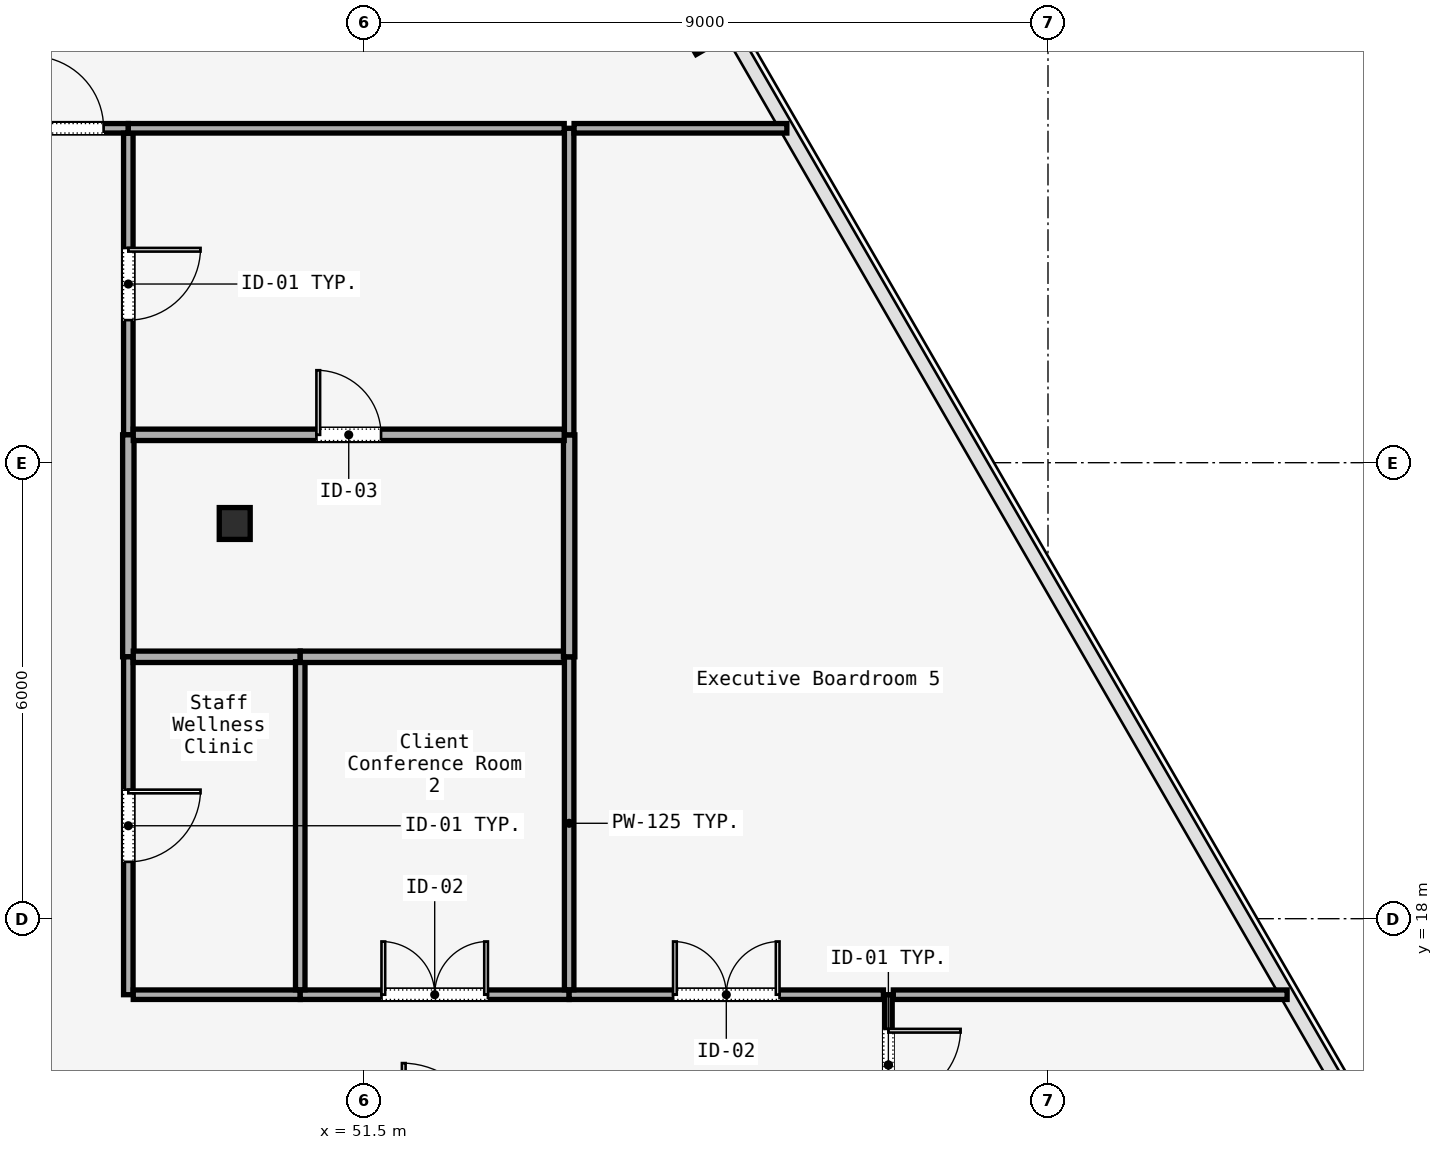
"""IFC4 building model, lengths in metres.
Left out: names, types, materials, properties, quantities, classifications, styles, units other than length and angle.
Written with IfcOpenShell. Run it as: python <this file> out.ifc"""

import sys

from ifc_helpers import new_model, si_unit, direction, frame, frame_2d, origin, origin_2d, place, context, subcontext, project, spatial, rectangle, i_section, extrude, element, fill, save


model = new_model("IFC4")
c1 = context("Model", 3, precision=1e-05, world=origin(), true_north=direction((0.0, 1.0)))
c2 = subcontext(c1, "Body", "Model", "MODEL_VIEW")
j1 = project(units=[si_unit("LENGTHUNIT", "METRE"), si_unit("PLANEANGLEUNIT", "RADIAN")], contexts=[c1])
p1 = place(None, origin())
s1 = spatial("IfcSite", under=j1, at=p1, CompositionType="ELEMENT")
p2 = place(p1, origin())
s2 = spatial("IfcBuilding", under=s1, at=p2, CompositionType="ELEMENT")
p3 = place(p2, frame((0.0, 0.0, 187.8)))
s3 = spatial("IfcBuildingStorey", under=s2, at=p3, CompositionType="ELEMENT", Elevation=187.8)
p4 = place(p3, frame((49.8, 23.2, 0.0), z_axis=(0.0, 0.0, 1.0), x_axis=(1.0, 0.0, 0.0)))
e1 = element("IfcColumn", 1, at=p4, inside=s3, PredefinedType="COLUMN", context=c2, shape_type="SweptSolid", body=[
    extrude(i_section(OverallWidth=0.407, OverallDepth=0.419, WebThickness=0.031, FlangeThickness=0.049, FilletRadius=0.015, at=origin_2d()), origin(), (0.0, 0.0, 1.0), 3.58),
])
p5 = place(p3, frame((55.964, 29.666, 0.0), z_axis=(-0.042672137749, -0.074064697685, 0.996340057017), x_axis=(-0.002485402633, 0.997253204902, 0.074026131112)))
e2 = element("IfcColumn", 2, at=p5, inside=s3, PredefinedType="COLUMN", context=c2, shape_type="SweptSolid", body=[
    extrude(i_section(OverallWidth=0.418, OverallDepth=0.455, WebThickness=0.042, FlangeThickness=0.052, FilletRadius=0.015, at=origin_2d()), origin(), (0.0, 0.0, 1.0), 3.593),
])
p6 = place(p3, frame((58.4, 17.0, 0.0), z_axis=(0.0, 0.0, 1.0), x_axis=(0.0, -1.0, 0.0)))
e3 = element("IfcWall", 3, at=p6, inside=s3, PredefinedType="MOVABLE", context=c2, shape_type="SweptSolid", body=[
    extrude(rectangle(XDim=1.85, YDim=0.1, at=frame_2d((0.925, 0.0))), origin(), (0.0, 0.0, 1.0), 3.01),
])
p7 = place(p6, frame((0.45, 0.0, 0.0)))
e4 = element("IfcOpeningElement", 4, at=p7, cuts=e3, PredefinedType="OPENING", context=c2, shape_type="SweptSolid", body=[
    extrude(rectangle(XDim=0.95, YDim=2.2, at=frame_2d((0.475, 1.1))), frame((0.0, 0.05, 0.0), z_axis=(0.0, -1.0, 0.0), x_axis=(1.0, 0.0, 0.0)), (0.0, 0.0, 1.0), 0.1),
])
p8 = place(p3, frame((46.8, 28.4, 0.0), z_axis=(0.0, 0.0, 1.0), x_axis=(1.0, 0.0, 0.0)))
e5 = element("IfcWall", 5, at=p8, inside=s3, PredefinedType="PARTITIONING", context=c2, shape_type="SweptSolid", body=[
    extrude(rectangle(XDim=1.6, YDim=0.125, at=frame_2d((0.8, 0.0))), origin(), (0.0, 0.0, 1.0), 3.01),
])
p9 = place(p8, frame((0.325, 0.0, 0.0)))
e6 = element("IfcOpeningElement", 6, at=p9, cuts=e5, PredefinedType="OPENING", context=c2, shape_type="SweptSolid", body=[
    extrude(rectangle(XDim=0.95, YDim=2.2, at=frame_2d((0.475, 1.1))), frame((0.0, 0.062, 0.0), z_axis=(0.0, -1.0, 0.0), x_axis=(1.0, 0.0, 0.0)), (0.0, 0.0, 1.0), 0.125),
])
p10 = place(p3, frame((48.4, 28.335, 0.0), z_axis=(0.0, 0.0, 1.0), x_axis=(0.0, -1.0, 0.0)))
e7 = element("IfcWall", 7, at=p10, inside=s3, PredefinedType="PARTITIONING", context=c2, shape_type="SweptSolid", body=[
    extrude(rectangle(XDim=3.968, YDim=0.125, at=frame_2d((1.984, 0.0))), origin(), (0.0, 0.0, 1.0), 3.01),
])
p11 = place(p10, frame((1.509, 0.0, 0.0)))
e8 = element("IfcOpeningElement", 8, at=p11, cuts=e7, PredefinedType="OPENING", context=c2, shape_type="SweptSolid", body=[
    extrude(rectangle(XDim=0.95, YDim=2.2, at=frame_2d((0.475, 1.1))), frame((0.0, 0.062, 0.0), z_axis=(0.0, -1.0, 0.0), x_axis=(1.0, 0.0, 0.0)), (0.0, 0.0, 1.0), 0.125),
])
p12 = place(p3, frame((48.4, 24.367, 0.0), z_axis=(0.0, 0.0, 1.0), x_axis=(0.0, -1.0, 0.0)))
e9 = element("IfcWall", 9, at=p12, inside=s3, PredefinedType="PARTITIONING", context=c2, shape_type="SweptSolid", body=[
    extrude(rectangle(XDim=2.921, YDim=0.15, at=frame_2d((1.46, 0.0))), origin(), (0.0, 0.0, 1.0), 3.01),
])
p13 = place(p3, frame((48.4, 21.446, 0.0), z_axis=(0.0, 0.0, 1.0), x_axis=(0.0, -1.0, 0.0)))
e10 = element("IfcWall", 10, at=p13, inside=s3, PredefinedType="PARTITIONING", context=c2, shape_type="SweptSolid", body=[
    extrude(rectangle(XDim=4.446, YDim=0.125, at=frame_2d((2.223, 0.0))), origin(), (0.0, 0.0, 1.0), 3.01),
])
p14 = place(p13, frame((1.748, 0.0, 0.0)))
e11 = element("IfcOpeningElement", 11, at=p14, cuts=e10, PredefinedType="OPENING", context=c2, shape_type="SweptSolid", body=[
    extrude(rectangle(XDim=0.95, YDim=2.2, at=frame_2d((0.475, 1.1))), frame((0.0, 0.062, 0.0), z_axis=(0.0, -1.0, 0.0), x_axis=(1.0, 0.0, 0.0)), (0.0, 0.0, 1.0), 0.125),
])
p15 = place(p3, frame((48.465, 17.0, 0.0), z_axis=(0.0, 0.0, 1.0), x_axis=(1.0, 0.0, 0.0)))
e12 = element("IfcWall", 12, at=p15, inside=s3, PredefinedType="PARTITIONING", context=c2, shape_type="SweptSolid", body=[
    extrude(rectangle(XDim=2.197, YDim=0.125, at=frame_2d((1.099, 0.0))), origin(), (0.0, 0.0, 1.0), 3.01),
])
p16 = place(p3, frame((50.662, 17.0, 0.0), z_axis=(0.0, 0.0, 1.0), x_axis=(1.0, 0.0, 0.0)))
e13 = element("IfcWall", 13, at=p16, inside=s3, PredefinedType="PARTITIONING", context=c2, shape_type="SweptSolid", body=[
    extrude(rectangle(XDim=3.538, YDim=0.125, at=frame_2d((1.769, 0.0))), origin(), (0.0, 0.0, 1.0), 3.01),
])
p17 = place(p16, frame((1.069, 0.0, 0.0)))
e14 = element("IfcOpeningElement", 14, at=p17, cuts=e13, PredefinedType="OPENING", context=c2, shape_type="SweptSolid", body=[
    extrude(rectangle(XDim=1.4, YDim=2.2, at=frame_2d((0.7, 1.1))), frame((0.0, 0.062, 0.0), z_axis=(0.0, -1.0, 0.0), x_axis=(1.0, 0.0, 0.0)), (0.0, 0.0, 1.0), 0.125),
])
p18 = place(p3, frame((54.2, 17.0, 0.0), z_axis=(0.0, 0.0, 1.0), x_axis=(1.0, 0.0, 0.0)))
e15 = element("IfcWall", 15, at=p18, inside=s3, PredefinedType="PARTITIONING", context=c2, shape_type="SweptSolid", body=[
    extrude(rectangle(XDim=4.135, YDim=0.125, at=frame_2d((2.067, 0.0))), origin(), (0.0, 0.0, 1.0), 3.01),
])
p19 = place(p18, frame((1.367, 0.0, 0.0)))
e16 = element("IfcOpeningElement", 16, at=p19, cuts=e15, PredefinedType="OPENING", context=c2, shape_type="SweptSolid", body=[
    extrude(rectangle(XDim=1.4, YDim=2.2, at=frame_2d((0.7, 1.1))), frame((0.0, 0.062, 0.0), z_axis=(0.0, -1.0, 0.0), x_axis=(1.0, 0.0, 0.0)), (0.0, 0.0, 1.0), 0.125),
])
p20 = place(p3, frame((58.465, 17.0, 0.0), z_axis=(0.0, 0.0, 1.0), x_axis=(1.0, 0.0, 0.0)))
e17 = element("IfcWall", 17, at=p20, inside=s3, PredefinedType="PARTITIONING", context=c2, shape_type="SweptSolid", body=[
    extrude(rectangle(XDim=5.181, YDim=0.125, at=frame_2d((2.59, 0.0))), origin(), (0.0, 0.0, 1.0), 3.01),
])
p21 = place(p3, frame((48.465, 21.446, 0.0), z_axis=(0.0, 0.0, 1.0), x_axis=(1.0, 0.0, 0.0)))
e18 = element("IfcWall", 18, at=p21, inside=s3, PredefinedType="PARTITIONING", context=c2, shape_type="SweptSolid", body=[
    extrude(rectangle(XDim=2.197, YDim=0.15, at=frame_2d((1.099, 0.0))), origin(), (0.0, 0.0, 1.0), 3.01),
])
p22 = place(p3, frame((50.662, 21.381, 0.0), z_axis=(0.0, 0.0, 1.0), x_axis=(0.0, -1.0, 0.0)))
e19 = element("IfcWall", 19, at=p22, inside=s3, PredefinedType="PARTITIONING", context=c2, shape_type="SweptSolid", body=[
    extrude(rectangle(XDim=4.316, YDim=0.125, at=frame_2d((2.158, 0.0))), origin(), (0.0, 0.0, 1.0), 3.01),
])
p23 = place(p3, frame((54.2, 21.446, 0.0), z_axis=(0.0, 0.0, 1.0), x_axis=(0.0, -1.0, 0.0)))
e20 = element("IfcWall", 20, at=p23, inside=s3, PredefinedType="PARTITIONING", context=c2, shape_type="SweptSolid", body=[
    extrude(rectangle(XDim=4.381, YDim=0.125, at=frame_2d((2.19, 0.0))), origin(), (0.0, 0.0, 1.0), 3.01),
])
p24 = place(p3, frame((50.662, 21.446, 0.0), z_axis=(0.0, 0.0, 1.0), x_axis=(1.0, 0.0, 0.0)))
e21 = element("IfcWall", 21, at=p24, inside=s3, PredefinedType="PARTITIONING", context=c2, shape_type="SweptSolid", body=[
    extrude(rectangle(XDim=3.473, YDim=0.15, at=frame_2d((1.736, 0.0))), origin(), (0.0, 0.0, 1.0), 3.01),
])
p25 = place(p3, frame((54.2, 21.446, 0.0), z_axis=(0.0, 0.0, 1.0), x_axis=(0.0, 1.0, 0.0)))
e22 = element("IfcWall", 22, at=p25, inside=s3, PredefinedType="PARTITIONING", context=c2, shape_type="SweptSolid", body=[
    extrude(rectangle(XDim=2.921, YDim=0.15, at=frame_2d((1.46, 0.0))), origin(), (0.0, 0.0, 1.0), 3.01),
])
p26 = place(p3, frame((54.2, 24.367, 0.0), z_axis=(0.0, 0.0, 1.0), x_axis=(0.0, 1.0, 0.0)))
e23 = element("IfcWall", 23, at=p26, inside=s3, PredefinedType="PARTITIONING", context=c2, shape_type="SweptSolid", body=[
    extrude(rectangle(XDim=4.033, YDim=0.125, at=frame_2d((2.017, 0.0))), origin(), (0.0, 0.0, 1.0), 3.01),
])
p27 = place(p3, frame((54.265, 28.4, 0.0), z_axis=(0.0, 0.0, 1.0), x_axis=(1.0, 0.0, 0.0)))
e24 = element("IfcWall", 24, at=p27, inside=s3, PredefinedType="PARTITIONING", context=c2, shape_type="SweptSolid", body=[
    extrude(rectangle(XDim=2.799, YDim=0.125, at=frame_2d((1.4, 0.0))), origin(), (0.0, 0.0, 1.0), 3.01),
])
p28 = place(p3, frame((48.465, 24.367, 0.0), z_axis=(0.0, 0.0, 1.0), x_axis=(1.0, 0.0, 0.0)))
e25 = element("IfcWall", 25, at=p28, inside=s3, PredefinedType="PARTITIONING", context=c2, shape_type="SweptSolid", body=[
    extrude(rectangle(XDim=5.67, YDim=0.15, at=frame_2d((2.835, 0.0))), origin(), (0.0, 0.0, 1.0), 3.01),
])
p29 = place(p28, frame((2.41, 0.0, 0.0)))
e26 = element("IfcOpeningElement", 26, at=p29, cuts=e25, PredefinedType="OPENING", context=c2, shape_type="SweptSolid", body=[
    extrude(rectangle(XDim=0.85, YDim=2.15, at=frame_2d((0.425, 1.075))), frame((0.0, 0.075, 0.0), z_axis=(0.0, -1.0, 0.0), x_axis=(1.0, 0.0, 0.0)), (0.0, 0.0, 1.0), 0.15),
])
p30 = place(p3, frame((48.4, 28.4, 0.0), z_axis=(0.0, 0.0, 1.0), x_axis=(1.0, 0.0, 0.0)))
e27 = element("IfcWall", 27, at=p30, inside=s3, PredefinedType="PARTITIONING", context=c2, shape_type="SweptSolid", body=[
    extrude(rectangle(XDim=5.735, YDim=0.125, at=frame_2d((2.868, 0.0))), origin(), (0.0, 0.0, 1.0), 3.01),
])
p31 = place(p7, origin())
e28 = element("IfcDoor", 28, at=p31, inside=s3, OperationType="SINGLE_SWING_LEFT", PredefinedType="DOOR", context=c2, shape_type="SweptSolid", body=[
    extrude(rectangle(XDim=0.95, YDim=2.2, at=frame_2d((0.475, 1.1))), frame((0.0, 0.025, 0.0), z_axis=(0.0, -1.0, 0.0), x_axis=(1.0, 0.0, 0.0)), (0.0, 0.0, 1.0), 0.05),
])
fill(e4, e28)
p32 = place(p14, origin())
e29 = element("IfcDoor", 29, at=p32, inside=s3, OperationType="SINGLE_SWING_LEFT", PredefinedType="DOOR", context=c2, shape_type="SweptSolid", body=[
    extrude(rectangle(XDim=0.95, YDim=2.2, at=frame_2d((0.475, 1.1))), frame((0.0, 0.025, 0.0), z_axis=(0.0, -1.0, 0.0), x_axis=(1.0, 0.0, 0.0)), (0.0, 0.0, 1.0), 0.05),
])
fill(e11, e29)
p33 = place(p17, origin())
e30 = element("IfcDoor", 30, at=p33, inside=s3, OperationType="SINGLE_SWING_RIGHT", PredefinedType="DOOR", context=c2, shape_type="SweptSolid", body=[
    extrude(rectangle(XDim=1.4, YDim=2.2, at=frame_2d((0.7, 1.1))), frame((0.0, 0.025, 0.0), z_axis=(0.0, -1.0, 0.0), x_axis=(1.0, 0.0, 0.0)), (0.0, 0.0, 1.0), 0.05),
])
fill(e14, e30)
p34 = place(p19, origin())
e31 = element("IfcDoor", 31, at=p34, inside=s3, OperationType="SINGLE_SWING_RIGHT", PredefinedType="DOOR", context=c2, shape_type="SweptSolid", body=[
    extrude(rectangle(XDim=1.4, YDim=2.2, at=frame_2d((0.7, 1.1))), frame((0.0, 0.025, 0.0), z_axis=(0.0, -1.0, 0.0), x_axis=(1.0, 0.0, 0.0)), (0.0, 0.0, 1.0), 0.05),
])
fill(e16, e31)
p35 = place(p29, origin())
e32 = element("IfcDoor", 32, at=p35, inside=s3, OperationType="SINGLE_SWING_LEFT", PredefinedType="DOOR", context=c2, shape_type="SweptSolid", body=[
    extrude(rectangle(XDim=0.85, YDim=2.15, at=frame_2d((0.425, 1.075))), frame((0.0, 0.025, 0.0), z_axis=(0.0, -1.0, 0.0), x_axis=(1.0, 0.0, 0.0)), (0.0, 0.0, 1.0), 0.05),
])
fill(e26, e32)
p36 = place(p11, origin())
e33 = element("IfcDoor", 33, at=p36, inside=s3, OperationType="SINGLE_SWING_RIGHT", PredefinedType="DOOR", context=c2, shape_type="SweptSolid", body=[
    extrude(rectangle(XDim=0.95, YDim=2.2, at=frame_2d((0.475, 1.1))), frame((0.0, 0.025, 0.0), z_axis=(0.0, -1.0, 0.0), x_axis=(1.0, 0.0, 0.0)), (0.0, 0.0, 1.0), 0.05),
])
fill(e8, e33)
p37 = place(p9, origin())
e34 = element("IfcDoor", 34, at=p37, inside=s3, OperationType="SINGLE_SWING_RIGHT", PredefinedType="DOOR", context=c2, shape_type="SweptSolid", body=[
    extrude(rectangle(XDim=0.95, YDim=2.2, at=frame_2d((0.475, 1.1))), frame((0.0, 0.025, 0.0), z_axis=(0.0, -1.0, 0.0), x_axis=(1.0, 0.0, 0.0)), (0.0, 0.0, 1.0), 0.05),
])
fill(e6, e34)
save(model, sys.argv[1])
